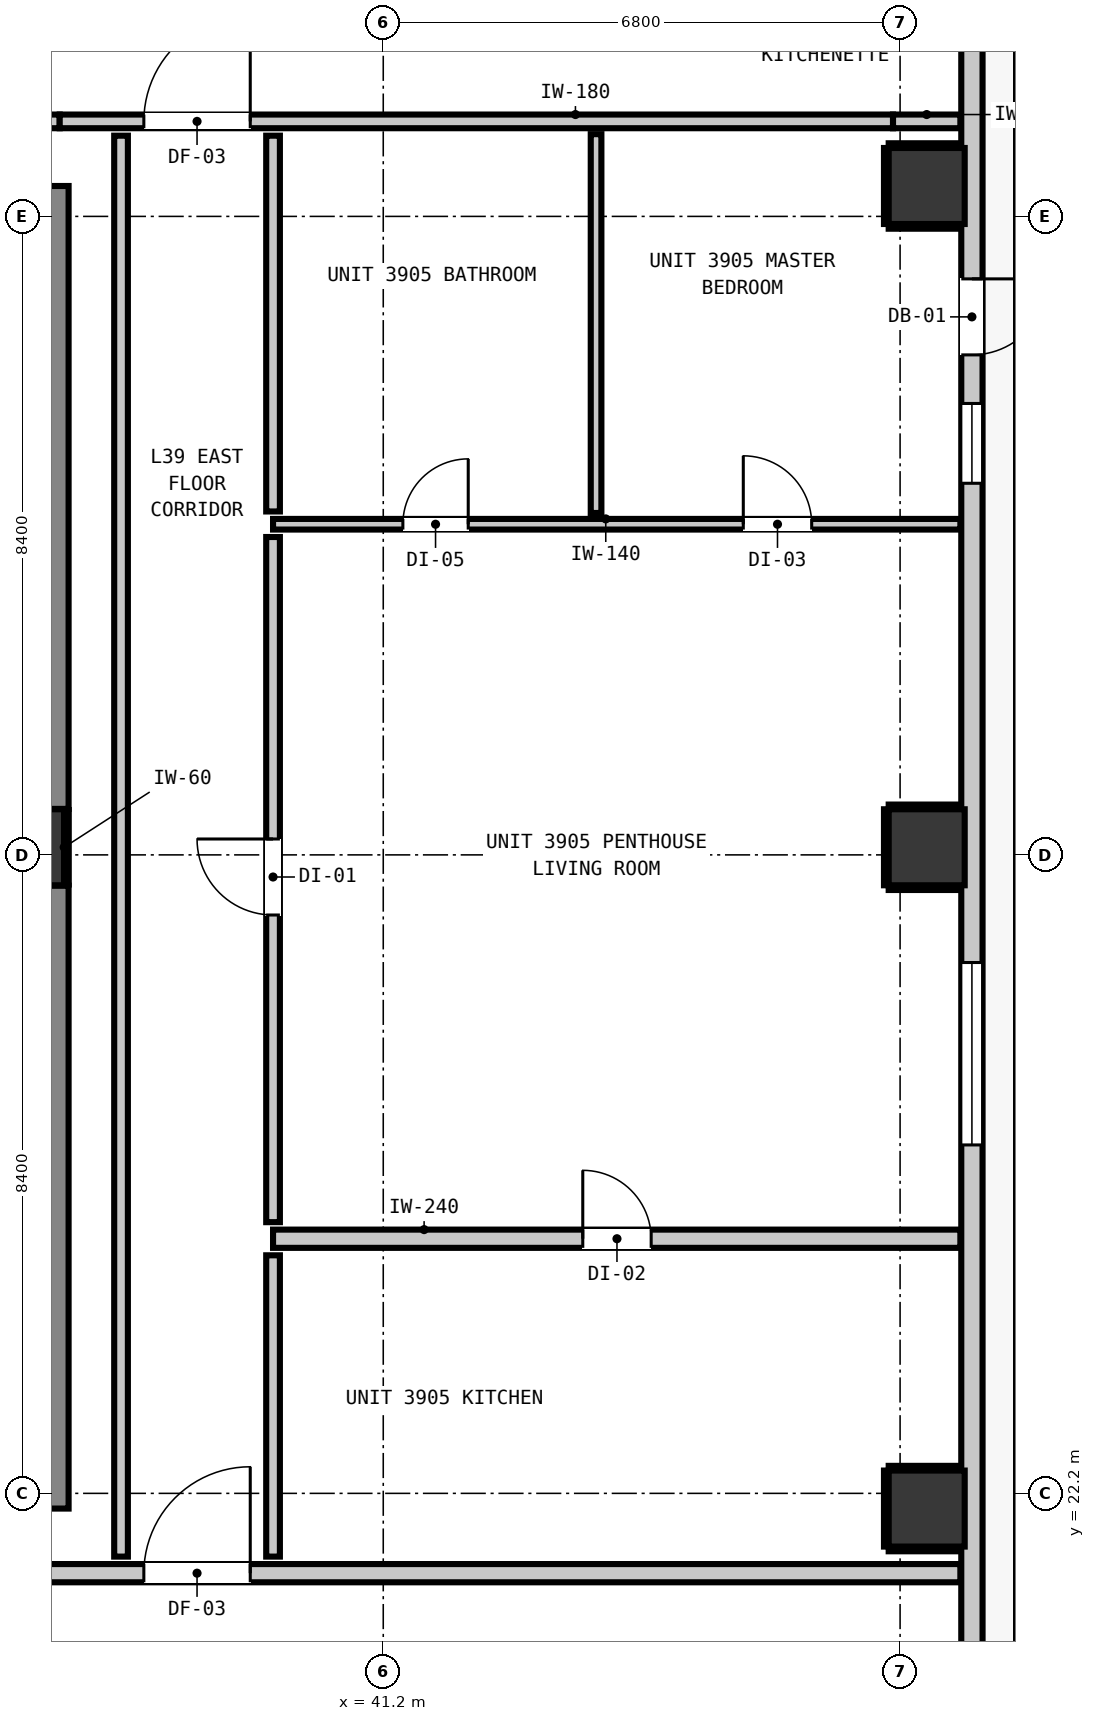
"""IFC4 building model, lengths in metres.
Left out: names, types, materials, properties, quantities, classifications, styles, units other than length and angle.
Written with IfcOpenShell. Run it as: python <this file> out.ifc"""

import sys

from ifc_helpers import new_model, si_unit, direction, frame, frame_2d, origin, origin_2d, place, context, subcontext, project, spatial, rectangle, extrude, element, fill, save


model = new_model("IFC4")
c1 = context("Model", 3, precision=1e-05, world=origin(), true_north=direction((0.0, 1.0)))
c2 = subcontext(c1, "Body", "Model", "MODEL_VIEW")
j1 = project(units=[si_unit("LENGTHUNIT", "METRE"), si_unit("PLANEANGLEUNIT", "RADIAN")], contexts=[c1])
p1 = place(None, origin())
s1 = spatial("IfcSite", under=j1, at=p1, CompositionType="ELEMENT")
p2 = place(p1, origin())
s2 = spatial("IfcBuilding", under=s1, at=p2, CompositionType="ELEMENT")
p3 = place(p2, frame((0.0, 0.0, 135.96)))
s3 = spatial("IfcBuildingStorey", under=s2, at=p3, CompositionType="ELEMENT", Elevation=135.96)
p4 = place(p3, frame((36.5, 30.7, 0.0), z_axis=(0.0, 0.0, 1.0), x_axis=(1.0, 0.0, 0.0)))
e1 = element("IfcColumn", 1, at=p4, inside=s3, PredefinedType="COLUMN", context=c2, shape_type="SweptSolid", body=[
    extrude(rectangle(XDim=1.0, YDim=1.0, at=origin_2d()), origin(), (0.0, 0.0, 1.0), 3.32),
])
p5 = place(p3, frame((36.56, 22.0, 0.0), z_axis=(0.0, 0.0, 1.0), x_axis=(0.0, 1.0, 0.0)))
e2 = element("IfcWall", 2, at=p5, inside=s3, PredefinedType="SHEAR", context=c2, shape_type="SweptSolid", body=[
    extrude(rectangle(XDim=8.195, YDim=1.0, at=frame_2d((4.098, 0.0))), origin(), (0.0, 0.0, 1.0), 3.32),
])
p6 = place(p3, frame((36.56, 31.205, 0.0), z_axis=(0.0, 0.0, 1.0), x_axis=(0.0, 1.0, 0.0)))
e3 = element("IfcWall", 3, at=p6, inside=s3, PredefinedType="SHEAR", context=c2, shape_type="SweptSolid", body=[
    extrude(rectangle(XDim=8.195, YDim=1.0, at=frame_2d((4.097, 0.0))), origin(), (0.0, 0.0, 1.0), 3.32),
])
for number, where, z_axis, x_axis in (
    (4, (48.35, 22.0, 0.0), (0.0, 0.0, 1.0), (1.0, 0.0, 0.0)),
    (5, (48.35, 30.7, 0.0), (0.0, 0.0, 1.0), (1.0, 0.0, 0.0)),
    (6, (48.35, 39.4, 0.0), (0.0, 0.0, 1.0), (1.0, 0.0, 0.0)),
):
    element("IfcColumn", number, at=place(p3, frame(where, z_axis=z_axis, x_axis=x_axis)), inside=s3, PredefinedType="COLUMN", context=c2, shape_type="SweptSolid", body=[
        extrude(rectangle(XDim=1.0, YDim=1.0, at=origin_2d()), origin(), (0.0, 0.0, 1.0), 3.32),
    ])
p7 = place(p3, frame((48.945, 43.645, 0.0), z_axis=(0.0, 0.0, 1.0), x_axis=(0.0, -1.0, 0.0)))
e7 = element("IfcWall", 7, at=p7, inside=s3, PredefinedType="STANDARD", context=c2, shape_type="SweptSolid", body=[
    extrude(rectangle(XDim=32.29, YDim=0.28, at=frame_2d((16.145, 0.0))), origin(), (0.0, 0.0, 1.0), 3.08),
])
p8 = place(p7, frame((5.467, 0.0, 0.0)))
e8 = element("IfcOpeningElement", 8, at=p8, cuts=e7, PredefinedType="OPENING", context=c2, shape_type="SweptSolid", body=[
    extrude(rectangle(XDim=1.0, YDim=2.15, at=frame_2d((0.5, 1.075))), frame((0.0, 0.15, 0.0), z_axis=(0.0, -1.0, 0.0), x_axis=(1.0, 0.0, 0.0)), (0.0, 0.0, 1.0), 0.3),
])
p9 = place(p7, frame((30.696, 0.0, 0.85)))
e9 = element("IfcOpeningElement", 9, at=p9, cuts=e7, PredefinedType="OPENING", context=c2, shape_type="SweptSolid", body=[
    extrude(rectangle(XDim=1.05, YDim=1.65, at=frame_2d((0.525, 0.825))), frame((0.0, 0.15, 0.0), z_axis=(0.0, -1.0, 0.0), x_axis=(1.0, 0.0, 0.0)), (0.0, 0.0, 1.0), 0.3),
])
p10 = place(p7, frame((14.461, 0.0, 0.85)))
e10 = element("IfcOpeningElement", 10, at=p10, cuts=e7, PredefinedType="OPENING", context=c2, shape_type="SweptSolid", body=[
    extrude(rectangle(XDim=2.4, YDim=1.95, at=frame_2d((1.2, 0.975))), frame((0.0, 0.15, 0.0), z_axis=(0.0, -1.0, 0.0), x_axis=(1.0, 0.0, 0.0)), (0.0, 0.0, 1.0), 0.3),
])
p11 = place(p7, frame((7.106, 0.0, 0.85)))
e11 = element("IfcOpeningElement", 11, at=p11, cuts=e7, PredefinedType="OPENING", context=c2, shape_type="SweptSolid", body=[
    extrude(rectangle(XDim=1.05, YDim=1.65, at=frame_2d((0.525, 0.825))), frame((0.0, 0.15, 0.0), z_axis=(0.0, -1.0, 0.0), x_axis=(1.0, 0.0, 0.0)), (0.0, 0.0, 1.0), 0.3),
])
p12 = place(p3, frame((9.407, 21.15, 0.0), z_axis=(0.0, 0.0, 1.0), x_axis=(1.0, 0.0, 0.0)))
e12 = element("IfcWall", 12, at=p12, inside=s3, PredefinedType="PARTITIONING", context=c2, shape_type="SweptSolid", body=[
    extrude(rectangle(XDim=39.386, YDim=0.24, at=frame_2d((19.693, 0.0))), origin(), (0.0, 0.0, 1.0), 3.08),
])
p13 = place(p12, frame((8.803, 0.0, 0.0)))
e13 = element("IfcOpeningElement", 13, at=p13, cuts=e12, PredefinedType="OPENING", context=c2, shape_type="SweptSolid", body=[
    extrude(rectangle(XDim=1.1, YDim=2.15, at=frame_2d((0.55, 1.075))), frame((0.0, 0.13, 0.0), z_axis=(0.0, -1.0, 0.0), x_axis=(1.0, 0.0, 0.0)), (0.0, 0.0, 1.0), 0.26),
])
p14 = place(p12, frame((1.192, 0.0, 0.0)))
e14 = element("IfcOpeningElement", 14, at=p14, cuts=e12, PredefinedType="OPENING", context=c2, shape_type="SweptSolid", body=[
    extrude(rectangle(XDim=1.4, YDim=2.15, at=frame_2d((0.7, 1.075))), frame((0.0, 0.13, 0.0), z_axis=(0.0, -1.0, 0.0), x_axis=(1.0, 0.0, 0.0)), (0.0, 0.0, 1.0), 0.26),
])
p15 = place(p12, frame((28.643, 0.0, 0.0)))
e15 = element("IfcOpeningElement", 15, at=p15, cuts=e12, PredefinedType="OPENING", context=c2, shape_type="SweptSolid", body=[
    extrude(rectangle(XDim=1.4, YDim=2.15, at=frame_2d((0.7, 1.075))), frame((0.0, 0.13, 0.0), z_axis=(0.0, -1.0, 0.0), x_axis=(1.0, 0.0, 0.0)), (0.0, 0.0, 1.0), 0.26),
])
p16 = place(p3, frame((39.75, 25.55, 0.0), z_axis=(0.0, 0.0, 1.0), x_axis=(1.0, 0.0, 0.0)))
e16 = element("IfcWall", 16, at=p16, inside=s3, PredefinedType="PARTITIONING", context=c2, shape_type="SweptSolid", body=[
    extrude(rectangle(XDim=9.043, YDim=0.24, at=frame_2d((4.521, 0.0))), origin(), (0.0, 0.0, 1.0), 3.08),
])
p17 = place(p16, frame((4.075, 0.0, 0.0)))
e17 = element("IfcOpeningElement", 17, at=p17, cuts=e16, PredefinedType="OPENING", context=c2, shape_type="SweptSolid", body=[
    extrude(rectangle(XDim=0.9, YDim=2.1, at=frame_2d((0.45, 1.05))), frame((0.0, 0.13, 0.0), z_axis=(0.0, -1.0, 0.0), x_axis=(1.0, 0.0, 0.0)), (0.0, 0.0, 1.0), 0.26),
])
p18 = place(p3, frame((9.407, 40.25, 0.0), z_axis=(0.0, 0.0, 1.0), x_axis=(1.0, 0.0, 0.0)))
e18 = element("IfcWall", 18, at=p18, inside=s3, PredefinedType="PARTITIONING", context=c2, shape_type="SweptSolid", body=[
    extrude(rectangle(XDim=27.536, YDim=0.18, at=frame_2d((13.768, 0.0))), origin(), (0.0, 0.0, 1.0), 3.08),
])
p19 = place(p18, frame((8.028, 0.0, 0.0)))
e19 = element("IfcOpeningElement", 19, at=p19, cuts=e18, PredefinedType="OPENING", context=c2, shape_type="SweptSolid", body=[
    extrude(rectangle(XDim=1.4, YDim=2.15, at=frame_2d((0.7, 1.075))), frame((0.0, 0.1, 0.0), z_axis=(0.0, -1.0, 0.0), x_axis=(1.0, 0.0, 0.0)), (0.0, 0.0, 1.0), 0.2),
])
p20 = place(p18, frame((1.192, 0.0, 0.0)))
e20 = element("IfcOpeningElement", 20, at=p20, cuts=e18, PredefinedType="OPENING", context=c2, shape_type="SweptSolid", body=[
    extrude(rectangle(XDim=1.4, YDim=2.15, at=frame_2d((0.7, 1.075))), frame((0.0, 0.1, 0.0), z_axis=(0.0, -1.0, 0.0), x_axis=(1.0, 0.0, 0.0)), (0.0, 0.0, 1.0), 0.2),
])
p21 = place(p3, frame((36.943, 40.25, 0.0), z_axis=(0.0, 0.0, 1.0), x_axis=(1.0, 0.0, 0.0)))
e21 = element("IfcWall", 21, at=p21, inside=s3, PredefinedType="PARTITIONING", context=c2, shape_type="SweptSolid", body=[
    extrude(rectangle(XDim=10.964, YDim=0.18, at=frame_2d((5.482, 0.0))), origin(), (0.0, 0.0, 1.0), 2.565),
])
p22 = place(p21, frame((1.107, 0.0, 0.0)))
e22 = element("IfcOpeningElement", 22, at=p22, cuts=e21, PredefinedType="OPENING", context=c2, shape_type="SweptSolid", body=[
    extrude(rectangle(XDim=1.4, YDim=2.15, at=frame_2d((0.7, 1.075))), frame((0.0, 0.1, 0.0), z_axis=(0.0, -1.0, 0.0), x_axis=(1.0, 0.0, 0.0)), (0.0, 0.0, 1.0), 0.2),
])
p23 = place(p3, frame((47.907, 40.25, 0.0), z_axis=(0.0, 0.0, 1.0), x_axis=(1.0, 0.0, 0.0)))
e23 = element("IfcWall", 23, at=p23, inside=s3, PredefinedType="PARTITIONING", context=c2, shape_type="SweptSolid", body=[
    extrude(rectangle(XDim=0.886, YDim=0.18, at=frame_2d((0.443, 0.0))), origin(), (0.0, 0.0, 1.0), 3.08),
])
p24 = place(p3, frame((39.75, 34.95, 0.0), z_axis=(0.0, 0.0, 1.0), x_axis=(1.0, 0.0, 0.0)))
e24 = element("IfcWall", 24, at=p24, inside=s3, PredefinedType="PARTITIONING", context=c2, shape_type="SweptSolid", body=[
    extrude(rectangle(XDim=9.043, YDim=0.14, at=frame_2d((4.521, 0.0))), origin(), (0.0, 0.0, 1.0), 3.08),
])
p25 = place(p24, frame((1.708, 0.0, 0.0)))
e25 = element("IfcOpeningElement", 25, at=p25, cuts=e24, PredefinedType="OPENING", context=c2, shape_type="SweptSolid", body=[
    extrude(rectangle(XDim=0.86, YDim=2.02, at=frame_2d((0.43, 1.01))), frame((0.0, 0.08, 0.0), z_axis=(0.0, -1.0, 0.0), x_axis=(1.0, 0.0, 0.0)), (0.0, 0.0, 1.0), 0.16),
])
p26 = place(p24, frame((6.187, 0.0, 0.0)))
e26 = element("IfcOpeningElement", 26, at=p26, cuts=e24, PredefinedType="OPENING", context=c2, shape_type="SweptSolid", body=[
    extrude(rectangle(XDim=0.9, YDim=2.1, at=frame_2d((0.45, 1.05))), frame((0.0, 0.08, 0.0), z_axis=(0.0, -1.0, 0.0), x_axis=(1.0, 0.0, 0.0)), (0.0, 0.0, 1.0), 0.16),
])
p27 = place(p3, frame((37.75, 21.368, 0.0), z_axis=(0.0, 0.0, 1.0), x_axis=(0.0, 1.0, 0.0)))
e27 = element("IfcWall", 27, at=p27, inside=s3, PredefinedType="PARTITIONING", context=c2, shape_type="SweptSolid", body=[
    extrude(rectangle(XDim=18.694, YDim=0.18, at=frame_2d((9.347, 0.0))), origin(), (0.0, 0.0, 1.0), 3.08),
])
p28 = place(p3, frame((39.75, 21.368, 0.0), z_axis=(0.0, 0.0, 1.0), x_axis=(0.0, 1.0, 0.0)))
e28 = element("IfcWall", 28, at=p28, inside=s3, PredefinedType="PARTITIONING", context=c2, shape_type="SweptSolid", body=[
    extrude(rectangle(XDim=3.964, YDim=0.18, at=frame_2d((1.982, 0.0))), origin(), (0.0, 0.0, 1.0), 3.08),
])
p29 = place(p3, frame((39.75, 25.768, 0.0), z_axis=(0.0, 0.0, 1.0), x_axis=(0.0, 1.0, 0.0)))
e29 = element("IfcWall", 29, at=p29, inside=s3, PredefinedType="PARTITIONING", context=c2, shape_type="SweptSolid", body=[
    extrude(rectangle(XDim=9.014, YDim=0.18, at=frame_2d((4.507, 0.0))), origin(), (0.0, 0.0, 1.0), 3.08),
])
p30 = place(p29, frame((4.041, 0.0, 0.0)))
e30 = element("IfcOpeningElement", 30, at=p30, cuts=e29, PredefinedType="OPENING", context=c2, shape_type="SweptSolid", body=[
    extrude(rectangle(XDim=1.0, YDim=2.15, at=frame_2d((0.5, 1.075))), frame((0.0, 0.1, 0.0), z_axis=(0.0, -1.0, 0.0), x_axis=(1.0, 0.0, 0.0)), (0.0, 0.0, 1.0), 0.2),
])
p31 = place(p3, frame((39.75, 35.118, 0.0), z_axis=(0.0, 0.0, 1.0), x_axis=(0.0, 1.0, 0.0)))
e31 = element("IfcWall", 31, at=p31, inside=s3, PredefinedType="PARTITIONING", context=c2, shape_type="SweptSolid", body=[
    extrude(rectangle(XDim=4.944, YDim=0.18, at=frame_2d((2.472, 0.0))), origin(), (0.0, 0.0, 1.0), 3.08),
])
p32 = place(p3, frame((44.0, 35.098, 0.0), z_axis=(0.0, 0.0, 1.0), x_axis=(0.0, 1.0, 0.0)))
e32 = element("IfcWall", 32, at=p32, inside=s3, PredefinedType="PARTITIONING", context=c2, shape_type="SweptSolid", body=[
    extrude(rectangle(XDim=4.984, YDim=0.14, at=frame_2d((2.492, 0.0))), origin(), (0.0, 0.0, 1.0), 3.08),
])
p33 = place(p3, frame((37.032, 30.21, 0.0), z_axis=(0.0, 0.0, 1.0), x_axis=(0.0, 1.0, 0.0)))
e33 = element("IfcWall", 33, at=p33, inside=s3, PredefinedType="PARTITIONING", context=c2, shape_type="SweptSolid", body=[
    extrude(rectangle(XDim=0.98, YDim=0.06, at=frame_2d((0.49, 0.0))), origin(), (0.0, 0.0, 1.0), 1.45),
])
for number, where, z_axis, x_axis in (
    (34, (47.85, 21.468, 0.0), (0.0, 0.0, 1.0), (1.0, 0.0, 0.0)),
    (35, (47.85, 22.532, 0.0), (0.0, 0.0, 1.0), (1.0, 0.0, 0.0)),
):
    element("IfcWall", number, at=place(p3, frame(where, z_axis=z_axis, x_axis=x_axis)), inside=s3, PredefinedType="PARTITIONING", context=c2, shape_type="SweptSolid", body=[
        extrude(rectangle(XDim=0.94, YDim=0.06, at=frame_2d((0.47, 0.0))), origin(), (0.0, 0.0, 1.0), 1.45),
    ])
p34 = place(p3, frame((47.818, 21.5, 0.0), z_axis=(0.0, 0.0, 1.0), x_axis=(0.0, 1.0, 0.0)))
e36 = element("IfcWall", 36, at=p34, inside=s3, PredefinedType="PARTITIONING", context=c2, shape_type="SweptSolid", body=[
    extrude(rectangle(XDim=1.0, YDim=0.06, at=frame_2d((0.5, 0.0))), origin(), (0.0, 0.0, 1.0), 1.45),
])
for number, where, z_axis, x_axis in (
    (37, (47.85, 30.168, 0.0), (0.0, 0.0, 1.0), (1.0, 0.0, 0.0)),
    (38, (47.85, 31.232, 0.0), (0.0, 0.0, 1.0), (1.0, 0.0, 0.0)),
):
    element("IfcWall", number, at=place(p3, frame(where, z_axis=z_axis, x_axis=x_axis)), inside=s3, PredefinedType="PARTITIONING", context=c2, shape_type="SweptSolid", body=[
        extrude(rectangle(XDim=0.94, YDim=0.06, at=frame_2d((0.47, 0.0))), origin(), (0.0, 0.0, 1.0), 1.45),
    ])
p35 = place(p3, frame((47.818, 30.2, 0.0), z_axis=(0.0, 0.0, 1.0), x_axis=(0.0, 1.0, 0.0)))
e39 = element("IfcWall", 39, at=p35, inside=s3, PredefinedType="PARTITIONING", context=c2, shape_type="SweptSolid", body=[
    extrude(rectangle(XDim=1.0, YDim=0.06, at=frame_2d((0.5, 0.0))), origin(), (0.0, 0.0, 1.0), 1.45),
])
for number, where, z_axis, x_axis in (
    (40, (47.85, 38.868, 0.0), (0.0, 0.0, 1.0), (1.0, 0.0, 0.0)),
    (41, (47.85, 39.932, 0.0), (0.0, 0.0, 1.0), (1.0, 0.0, 0.0)),
):
    element("IfcWall", number, at=place(p3, frame(where, z_axis=z_axis, x_axis=x_axis)), inside=s3, PredefinedType="PARTITIONING", context=c2, shape_type="SweptSolid", body=[
        extrude(rectangle(XDim=0.94, YDim=0.06, at=frame_2d((0.47, 0.0))), origin(), (0.0, 0.0, 1.0), 1.45),
    ])
p36 = place(p3, frame((47.818, 38.9, 0.0), z_axis=(0.0, 0.0, 1.0), x_axis=(0.0, 1.0, 0.0)))
e42 = element("IfcWall", 42, at=p36, inside=s3, PredefinedType="PARTITIONING", context=c2, shape_type="SweptSolid", body=[
    extrude(rectangle(XDim=1.0, YDim=0.06, at=frame_2d((0.5, 0.0))), origin(), (0.0, 0.0, 1.0), 1.45),
])
p37 = place(p8, origin())
e43 = element("IfcDoor", 43, at=p37, inside=s3, OperationType="SINGLE_SWING_LEFT", PredefinedType="DOOR", context=c2, shape_type="SweptSolid", body=[
    extrude(rectangle(XDim=1.0, YDim=2.15, at=frame_2d((0.5, 1.075))), frame((0.0, 0.025, 0.0), z_axis=(0.0, -1.0, 0.0), x_axis=(1.0, 0.0, 0.0)), (0.0, 0.0, 1.0), 0.05),
])
fill(e8, e43)
p38 = place(p10, origin())
e44 = element("IfcWindow", 44, at=p38, inside=s3, PartitioningType="SINGLE_PANEL", PredefinedType="WINDOW", context=c2, shape_type="SweptSolid", body=[
    extrude(rectangle(XDim=2.4, YDim=1.95, at=frame_2d((1.2, 0.975))), frame((0.0, 0.03, 0.0), z_axis=(0.0, -1.0, 0.0), x_axis=(1.0, 0.0, 0.0)), (0.0, 0.0, 1.0), 0.06),
])
fill(e10, e44)
p39 = place(p11, origin())
e45 = element("IfcWindow", 45, at=p39, inside=s3, PartitioningType="SINGLE_PANEL", PredefinedType="WINDOW", context=c2, shape_type="SweptSolid", body=[
    extrude(rectangle(XDim=1.05, YDim=1.65, at=frame_2d((0.525, 0.825))), frame((0.0, 0.03, 0.0), z_axis=(0.0, -1.0, 0.0), x_axis=(1.0, 0.0, 0.0)), (0.0, 0.0, 1.0), 0.06),
])
fill(e11, e45)
p40 = place(p15, origin())
e46 = element("IfcDoor", 46, at=p40, inside=s3, OperationType="SINGLE_SWING_RIGHT", PredefinedType="DOOR", context=c2, shape_type="SweptSolid", body=[
    extrude(rectangle(XDim=1.4, YDim=2.15, at=frame_2d((0.7, 1.075))), frame((0.0, 0.025, 0.0), z_axis=(0.0, -1.0, 0.0), x_axis=(1.0, 0.0, 0.0)), (0.0, 0.0, 1.0), 0.05),
])
fill(e15, e46)
p41 = place(p22, origin())
e47 = element("IfcDoor", 47, at=p41, inside=s3, OperationType="SINGLE_SWING_RIGHT", PredefinedType="DOOR", context=c2, shape_type="SweptSolid", body=[
    extrude(rectangle(XDim=1.4, YDim=2.15, at=frame_2d((0.7, 1.075))), frame((0.0, 0.025, 0.0), z_axis=(0.0, -1.0, 0.0), x_axis=(1.0, 0.0, 0.0)), (0.0, 0.0, 1.0), 0.05),
])
fill(e22, e47)
p42 = place(p30, origin())
e48 = element("IfcDoor", 48, at=p42, inside=s3, OperationType="SINGLE_SWING_RIGHT", PredefinedType="DOOR", context=c2, shape_type="SweptSolid", body=[
    extrude(rectangle(XDim=1.0, YDim=2.15, at=frame_2d((0.5, 1.075))), frame((0.0, 0.025, 0.0), z_axis=(0.0, -1.0, 0.0), x_axis=(1.0, 0.0, 0.0)), (0.0, 0.0, 1.0), 0.05),
])
fill(e30, e48)
p43 = place(p17, origin())
e49 = element("IfcDoor", 49, at=p43, inside=s3, OperationType="SINGLE_SWING_LEFT", PredefinedType="DOOR", context=c2, shape_type="SweptSolid", body=[
    extrude(rectangle(XDim=0.9, YDim=2.1, at=frame_2d((0.45, 1.05))), frame((0.0, 0.025, 0.0), z_axis=(0.0, -1.0, 0.0), x_axis=(1.0, 0.0, 0.0)), (0.0, 0.0, 1.0), 0.05),
])
fill(e17, e49)
p44 = place(p25, origin())
e50 = element("IfcDoor", 50, at=p44, inside=s3, OperationType="SINGLE_SWING_RIGHT", PredefinedType="DOOR", context=c2, shape_type="SweptSolid", body=[
    extrude(rectangle(XDim=0.86, YDim=2.02, at=frame_2d((0.43, 1.01))), frame((0.0, 0.025, 0.0), z_axis=(0.0, -1.0, 0.0), x_axis=(1.0, 0.0, 0.0)), (0.0, 0.0, 1.0), 0.05),
])
fill(e25, e50)
p45 = place(p26, origin())
e51 = element("IfcDoor", 51, at=p45, inside=s3, OperationType="SINGLE_SWING_LEFT", PredefinedType="DOOR", context=c2, shape_type="SweptSolid", body=[
    extrude(rectangle(XDim=0.9, YDim=2.1, at=frame_2d((0.45, 1.05))), frame((0.0, 0.025, 0.0), z_axis=(0.0, -1.0, 0.0), x_axis=(1.0, 0.0, 0.0)), (0.0, 0.0, 1.0), 0.05),
])
fill(e26, e51)
save(model, sys.argv[1])
